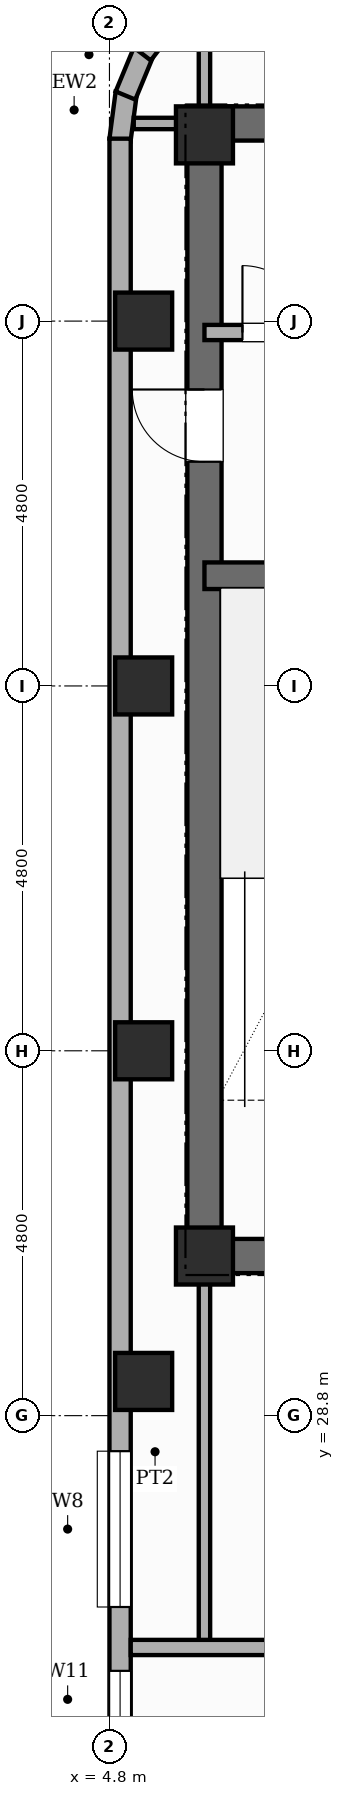
"""IFC4 building model, lengths in metres.
Left out: names, types, materials, properties, quantities, classifications, styles, units other than length and angle.
Written with IfcOpenShell. Run it as: python <this file> out.ifc"""

import sys

from ifc_helpers import new_model, si_unit, direction, frame, frame_2d, origin, origin_2d, place, context, subcontext, project, spatial, rectangle, extrude, element, fill, save


model = new_model("IFC4")
c1 = context("Model", 3, precision=1e-05, world=origin(), true_north=direction((0.0, 1.0)))
c2 = subcontext(c1, "Body", "Model", "MODEL_VIEW")
j1 = project(units=[si_unit("LENGTHUNIT", "METRE"), si_unit("PLANEANGLEUNIT", "RADIAN")], contexts=[c1])
p1 = place(None, origin())
s1 = spatial("IfcSite", under=j1, at=p1, CompositionType="ELEMENT")
p2 = place(p1, origin())
s2 = spatial("IfcBuilding", under=s1, at=p2, CompositionType="ELEMENT")
p3 = place(p2, frame((0.0, 0.0, 265.6)))
s3 = spatial("IfcBuildingStorey", under=s2, at=p3, CompositionType="ELEMENT", Elevation=265.6)
p4 = place(p3, frame((6.05, 30.675, 0.0), z_axis=(0.0, 0.0, 1.0), x_axis=(0.0, 1.0, 0.0)))
e1 = element("IfcWall", 1, at=p4, inside=s3, PredefinedType="SHEAR", context=c2, shape_type="SweptSolid", body=[
    extrude(rectangle(XDim=15.35, YDim=0.45, at=frame_2d((7.675, 0.0))), origin(), (0.0, 0.0, 1.0), 4.3),
])
p5 = place(p4, frame((10.675, 0.0, 0.0)))
e2 = element("IfcOpeningElement", 2, at=p5, cuts=e1, PredefinedType="OPENING", context=c2, shape_type="SweptSolid", body=[
    extrude(rectangle(XDim=0.95, YDim=2.15, at=frame_2d((0.475, 1.075))), frame((0.0, 0.235, 0.0), z_axis=(0.0, -1.0, 0.0), x_axis=(1.0, 0.0, 0.0)), (0.0, 0.0, 1.0), 0.47),
])
p6 = place(p3, frame((6.05, 45.8, 0.0), z_axis=(0.0, 0.0, 1.0), x_axis=(1.0, 0.0, 0.0)))
e3 = element("IfcWall", 3, at=p6, inside=s3, PredefinedType="SHEAR", context=c2, shape_type="SweptSolid", body=[
    extrude(rectangle(XDim=16.7, YDim=0.45, at=frame_2d((8.35, 0.0))), origin(), (0.0, 0.0, 1.0), 4.3),
])
p7 = place(p6, frame((13.57, 0.0, 0.0)))
e4 = element("IfcOpeningElement", 4, at=p7, cuts=e3, PredefinedType="OPENING", context=c2, shape_type="SweptSolid", body=[
    extrude(rectangle(XDim=0.95, YDim=2.15, at=frame_2d((0.475, 1.075))), frame((0.0, 0.235, 0.0), z_axis=(0.0, -1.0, 0.0), x_axis=(1.0, 0.0, 0.0)), (0.0, 0.0, 1.0), 0.47),
])
p8 = place(p3, frame((6.05, 30.9, 0.0), z_axis=(0.0, 0.0, 1.0), x_axis=(1.0, 0.0, 0.0)))
e5 = element("IfcWall", 5, at=p8, inside=s3, PredefinedType="SHEAR", context=c2, shape_type="SweptSolid", body=[
    extrude(rectangle(XDim=3.91, YDim=0.45, at=frame_2d((1.955, 0.0))), origin(), (0.0, 0.0, 1.0), 4.3),
])
p9 = place(p3, frame((6.05, 39.85, 0.0), z_axis=(0.0, 0.0, 1.0), x_axis=(1.0, 0.0, 0.0)))
e6 = element("IfcWall", 6, at=p9, inside=s3, PredefinedType="SHEAR", context=c2, shape_type="SweptSolid", body=[
    extrude(rectangle(XDim=3.91, YDim=0.35, at=frame_2d((1.955, 0.0))), origin(), (0.0, 0.0, 1.0), 4.3),
])
for number, where, z_axis, x_axis in (
    (7, (5.25, 29.25, 0.0), (0.0, 0.0, 1.0), (1.0, 0.0, 0.0)),
    (8, (5.25, 33.6, 0.0), (0.0, 0.0, 1.0), (1.0, 0.0, 0.0)),
    (9, (5.25, 38.4, 0.0), (0.0, 0.0, 1.0), (1.0, 0.0, 0.0)),
    (10, (5.25, 43.2, 0.0), (0.0, 0.0, 1.0), (1.0, 0.0, 0.0)),
    (11, (6.05, 30.9, 0.0), (0.0, 0.0, 1.0), (1.0, 0.0, 0.0)),
    (12, (6.05, 45.65, 0.0), (0.0, 0.0, 1.0), (1.0, 0.0, 0.0)),
):
    element("IfcColumn", number, at=place(p3, frame(where, z_axis=z_axis, x_axis=x_axis)), inside=s3, PredefinedType="COLUMN", context=c2, shape_type="SweptSolid", body=[
        extrude(rectangle(XDim=0.75, YDim=0.75, at=origin_2d()), origin(), (0.0, 0.0, 1.0), 4.3),
    ])
for number, where, z_axis, x_axis in (
    (13, (4.939, 45.582, 0.0), (0.0, 0.0, 1.0), (0.131, 0.991, 0.0)),
    (14, (5.011, 46.167, 0.0), (0.0, 0.0, 1.0), (0.383, 0.924, 0.0)),
    (15, (5.233, 46.715, 0.0), (0.0, 0.0, 1.0), (0.609, 0.793, 0.0)),
):
    element("IfcWall", number, at=place(p3, frame(where, z_axis=z_axis, x_axis=x_axis)), inside=s3, PredefinedType="STANDARD", context=c2, shape_type="SweptSolid", body=[
        extrude(rectangle(XDim=0.626, YDim=0.28, at=frame_2d((0.313, 0.0))), origin(), (0.0, 0.0, 1.0), 4.04),
    ])
p10 = place(p3, frame((4.94, 13.2, 0.0), z_axis=(0.0, 0.0, 1.0), x_axis=(0.0, 1.0, 0.0)))
e16 = element("IfcWall", 16, at=p10, inside=s3, PredefinedType="STANDARD", context=c2, shape_type="SweptSolid", body=[
    extrude(rectangle(XDim=32.4, YDim=0.28, at=frame_2d((16.2, 0.0))), origin(), (0.0, 0.0, 1.0), 3.32),
])
p11 = place(p10, frame((8.1, 0.0, 0.0)))
e17 = element("IfcOpeningElement", 17, at=p11, cuts=e16, PredefinedType="OPENING", context=c2, shape_type="SweptSolid", body=[
    extrude(rectangle(XDim=1.1, YDim=2.15, at=frame_2d((0.55, 1.075))), frame((0.0, 0.15, 0.0), z_axis=(0.0, -1.0, 0.0), x_axis=(1.0, 0.0, 0.0)), (0.0, 0.0, 1.0), 0.3),
])
p12 = place(p10, frame((1.847, 0.0, 0.8)))
e18 = element("IfcOpeningElement", 18, at=p12, cuts=e16, PredefinedType="OPENING", context=c2, shape_type="SweptSolid", body=[
    extrude(rectangle(XDim=1.2, YDim=1.8, at=frame_2d((0.6, 0.9))), frame((0.0, 0.15, 0.0), z_axis=(0.0, -1.0, 0.0), x_axis=(1.0, 0.0, 0.0)), (0.0, 0.0, 1.0), 0.3),
])
p13 = place(p10, frame((3.627, 0.0, 0.8)))
e19 = element("IfcOpeningElement", 19, at=p13, cuts=e16, PredefinedType="OPENING", context=c2, shape_type="SweptSolid", body=[
    extrude(rectangle(XDim=1.65, YDim=1.95, at=frame_2d((0.825, 0.975))), frame((0.0, 0.15, 0.0), z_axis=(0.0, -1.0, 0.0), x_axis=(1.0, 0.0, 0.0)), (0.0, 0.0, 1.0), 0.3),
])
p14 = place(p10, frame((13.083, 0.0, 0.8)))
e20 = element("IfcOpeningElement", 20, at=p14, cuts=e16, PredefinedType="OPENING", context=c2, shape_type="SweptSolid", body=[
    extrude(rectangle(XDim=2.05, YDim=1.95, at=frame_2d((1.025, 0.975))), frame((0.0, 0.15, 0.0), z_axis=(0.0, -1.0, 0.0), x_axis=(1.0, 0.0, 0.0)), (0.0, 0.0, 1.0), 0.3),
])
p15 = place(p10, frame((11.492, 0.0, 0.45)))
e21 = element("IfcOpeningElement", 21, at=p15, cuts=e16, PredefinedType="OPENING", context=c2, shape_type="SweptSolid", body=[
    extrude(rectangle(XDim=0.75, YDim=1.8, at=frame_2d((0.375, 0.9))), frame((0.0, 0.15, 0.0), z_axis=(0.0, -1.0, 0.0), x_axis=(1.0, 0.0, 0.0)), (0.0, 0.0, 1.0), 0.3),
])
p16 = place(p3, frame((6.05, 43.05, 0.0), z_axis=(0.0, 0.0, 1.0), x_axis=(1.0, 0.0, 0.0)))
e22 = element("IfcWall", 22, at=p16, inside=s3, PredefinedType="POLYGONAL", context=c2, shape_type="SweptSolid", body=[
    extrude(rectangle(XDim=3.91, YDim=0.2, at=frame_2d((1.955, 0.0))), origin(), (0.0, 0.0, 1.0), 3.32),
])
p17 = place(p16, frame((0.5, 0.0, 0.0)))
e23 = element("IfcOpeningElement", 23, at=p17, cuts=e22, PredefinedType="OPENING", context=c2, shape_type="SweptSolid", body=[
    extrude(rectangle(XDim=0.88, YDim=2.1, at=frame_2d((0.44, 1.05))), frame((0.0, 0.11, 0.0), z_axis=(0.0, -1.0, 0.0), x_axis=(1.0, 0.0, 0.0)), (0.0, 0.0, 1.0), 0.22),
])
p18 = place(p16, frame((2.35, 0.0, 0.0)))
e24 = element("IfcOpeningElement", 24, at=p18, cuts=e22, PredefinedType="OPENING", context=c2, shape_type="SweptSolid", body=[
    extrude(rectangle(XDim=0.88, YDim=2.1, at=frame_2d((0.44, 1.05))), frame((0.0, 0.11, 0.0), z_axis=(0.0, -1.0, 0.0), x_axis=(1.0, 0.0, 0.0)), (0.0, 0.0, 1.0), 0.22),
])
p19 = place(p3, frame((6.05, 25.75, 0.0), z_axis=(0.0, 0.0, 1.0), x_axis=(0.0, 1.0, 0.0)))
e25 = element("IfcWall", 25, at=p19, inside=s3, PredefinedType="PARTITIONING", context=c2, shape_type="SweptSolid", body=[
    extrude(rectangle(XDim=5.15, YDim=0.15, at=frame_2d((2.575, 0.0))), origin(), (0.0, 0.0, 1.0), 4.04),
])
p20 = place(p3, frame((5.08, 25.75, 0.0), z_axis=(0.0, 0.0, 1.0), x_axis=(1.0, 0.0, 0.0)))
e26 = element("IfcWall", 26, at=p20, inside=s3, PredefinedType="PARTITIONING", context=c2, shape_type="SweptSolid", body=[
    extrude(rectangle(XDim=8.52, YDim=0.2, at=frame_2d((4.26, 0.0))), origin(), (0.0, 0.0, 1.0), 4.04),
])
p21 = place(p3, frame((5.12, 45.8, 0.0), z_axis=(0.0, 0.0, 1.0), x_axis=(1.0, 0.0, 0.0)))
e27 = element("IfcWall", 27, at=p21, inside=s3, PredefinedType="PARTITIONING", context=c2, shape_type="SweptSolid", body=[
    extrude(rectangle(XDim=0.93, YDim=0.15, at=frame_2d((0.465, 0.0))), origin(), (0.0, 0.0, 1.0), 4.04),
])
p22 = place(p3, frame((6.05, 45.8, 0.0), z_axis=(0.0, 0.0, 1.0), x_axis=(0.0, 1.0, 0.0)))
e28 = element("IfcWall", 28, at=p22, inside=s3, PredefinedType="PARTITIONING", context=c2, shape_type="SweptSolid", body=[
    extrude(rectangle(XDim=1.5, YDim=0.15, at=frame_2d((0.75, 0.0))), origin(), (0.0, 0.0, 1.0), 4.04),
])
p23 = place(p14, origin())
e29 = element("IfcWindow", 29, at=p23, inside=s3, PartitioningType="SINGLE_PANEL", PredefinedType="WINDOW", context=c2, shape_type="SweptSolid", body=[
    extrude(rectangle(XDim=2.05, YDim=1.95, at=frame_2d((1.025, 0.975))), frame((0.0, 0.03, 0.0), z_axis=(0.0, -1.0, 0.0), x_axis=(1.0, 0.0, 0.0)), (0.0, 0.0, 1.0), 0.06),
])
fill(e20, e29)
p24 = place(p15, origin())
e30 = element("IfcWindow", 30, at=p24, inside=s3, PartitioningType="SINGLE_PANEL", PredefinedType="WINDOW", context=c2, shape_type="SweptSolid", body=[
    extrude(rectangle(XDim=0.75, YDim=1.8, at=frame_2d((0.375, 0.9))), frame((0.0, 0.03, 0.0), z_axis=(0.0, -1.0, 0.0), x_axis=(1.0, 0.0, 0.0)), (0.0, 0.0, 1.0), 0.06),
])
fill(e21, e30)
p25 = place(p5, origin())
e31 = element("IfcDoor", 31, at=p25, inside=s3, OperationType="SINGLE_SWING_RIGHT", PredefinedType="DOOR", context=c2, shape_type="SweptSolid", body=[
    extrude(rectangle(XDim=0.95, YDim=2.15, at=frame_2d((0.475, 1.075))), frame((0.0, 0.025, 0.0), z_axis=(0.0, -1.0, 0.0), x_axis=(1.0, 0.0, 0.0)), (0.0, 0.0, 1.0), 0.05),
])
fill(e2, e31)
p26 = place(p17, origin())
e32 = element("IfcDoor", 32, at=p26, inside=s3, OperationType="SINGLE_SWING_LEFT", PredefinedType="DOOR", context=c2, shape_type="SweptSolid", body=[
    extrude(rectangle(XDim=0.88, YDim=2.1, at=frame_2d((0.44, 1.05))), frame((0.0, 0.025, 0.0), z_axis=(0.0, -1.0, 0.0), x_axis=(1.0, 0.0, 0.0)), (0.0, 0.0, 1.0), 0.05),
])
fill(e23, e32)
save(model, sys.argv[1])
